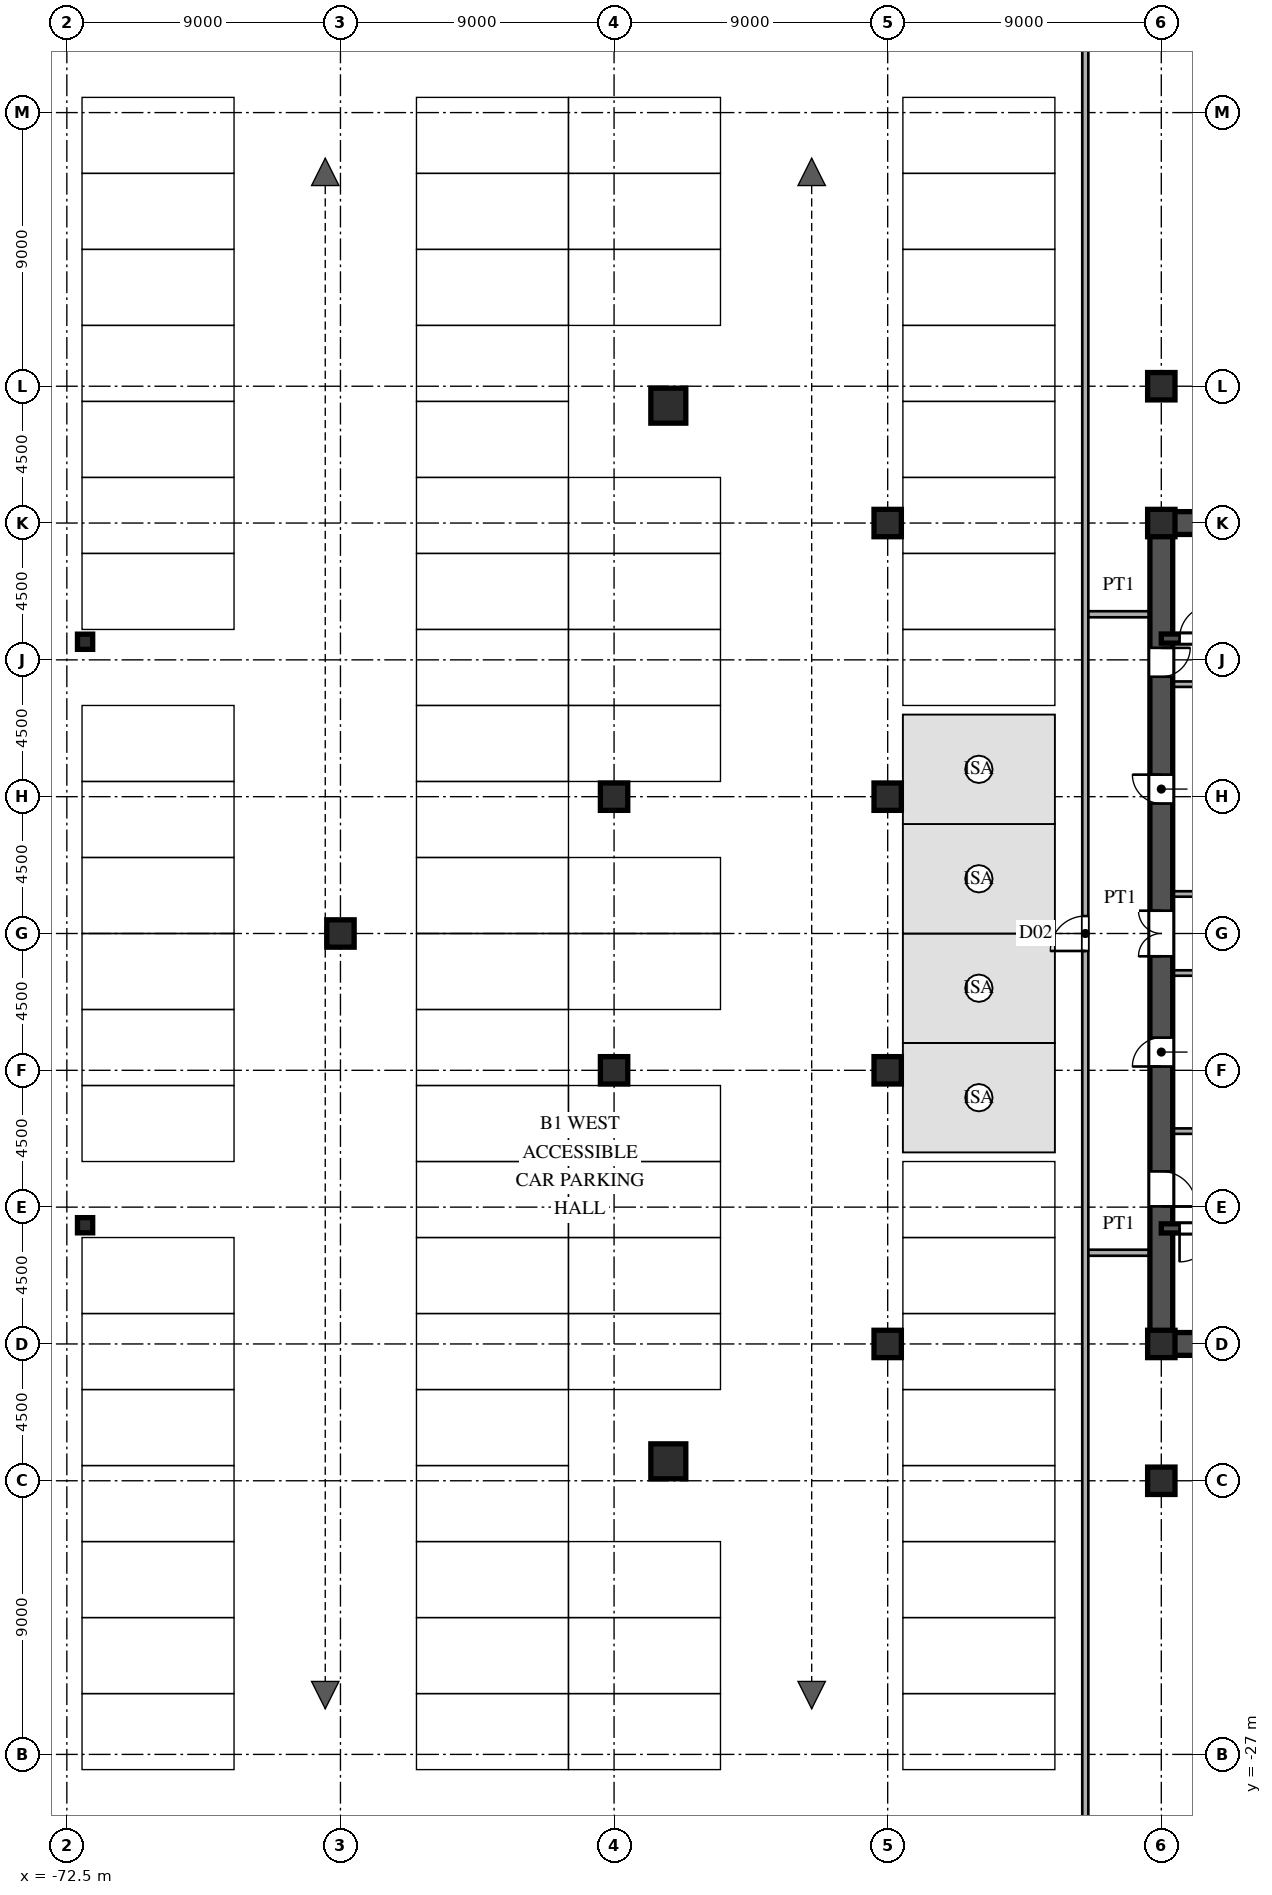
"""IFC4 building model, lengths in metres.
Left out: names, types, materials, properties, quantities, classifications, styles, units other than length and angle.
Written with IfcOpenShell. Run it as: python <this file> out.ifc"""

import sys

from ifc_helpers import new_model, si_unit, direction, frame, frame_2d, origin, origin_2d, place, context, subcontext, project, spatial, rectangle, hollow_rectangle, i_section, extrude, source, transform, mapped, element, fill, save


model = new_model("IFC4")
c1 = context("Model", 3, precision=1e-05, world=origin(), true_north=direction((0.0, 1.0)))
c2 = subcontext(c1, "Body", "Model", "MODEL_VIEW")
j1 = project(units=[si_unit("LENGTHUNIT", "METRE"), si_unit("PLANEANGLEUNIT", "RADIAN")], contexts=[c1])
p1 = place(None, origin())
s1 = spatial("IfcSite", under=j1, at=p1, CompositionType="ELEMENT")
p2 = place(p1, origin())
s2 = spatial("IfcBuilding", under=s1, at=p2, CompositionType="ELEMENT")
p3 = place(p2, frame((0.0, 0.0, -4.8)))
s3 = spatial("IfcBuildingStorey", under=s2, at=p3, CompositionType="ELEMENT", Elevation=-4.8)
m1 = source(origin(), c2, "Body", "SweptSolid", [
    extrude(i_section(OverallWidth=0.9, OverallDepth=0.9, WebThickness=0.036, FlangeThickness=0.055, at=origin_2d()), origin(), (0.0, 0.0, 1.0), 4.8),
])
for number, where, z_axis, x_axis in (
    (1, (-36.5, -18.0, 0.0), (0.0, 0.0, 1.0), (1.0, 0.0, 0.0)),
    (2, (-36.5, -13.5, 0.0), (0.0, 0.0, 1.0), (1.0, 0.0, 0.0)),
    (3, (-36.5, 13.5, 0.0), (0.0, 0.0, 1.0), (1.0, 0.0, 0.0)),
    (4, (-36.5, 18.0, 0.0), (0.0, 0.0, 1.0), (1.0, 0.0, 0.0)),
    (5, (-45.5, -13.5, 0.0), (0.0, 0.0, 1.0), (1.0, 0.0, 0.0)),
    (6, (-45.5, -4.5, 0.0), (0.0, 0.0, 1.0), (1.0, 0.0, 0.0)),
    (7, (-45.5, 4.5, 0.0), (0.0, 0.0, 1.0), (1.0, 0.0, 0.0)),
    (8, (-45.5, 13.5, 0.0), (0.0, 0.0, 1.0), (1.0, 0.0, 0.0)),
    (9, (-54.5, -4.5, 0.0), (0.0, 0.0, 1.0), (1.0, 0.0, 0.0)),
    (10, (-54.5, 4.5, 0.0), (0.0, 0.0, 1.0), (1.0, 0.0, 0.0)),
    (11, (-63.5, 0.0, 0.0), (0.0, 0.0, 1.0), (1.0, 0.0, 0.0)),
):
    element("IfcColumn", number, at=place(p3, frame(where, z_axis=z_axis, x_axis=x_axis)), inside=s3, PredefinedType="COLUMN", context=c2, shape_type="MappedRepresentation", body=[
        mapped(m1, transform((0.0, 0.0, 0.0), scale=1.0)),
    ])
m2 = source(origin(), c2, "Body", "SweptSolid", [
    extrude(hollow_rectangle(XDim=0.5, YDim=0.5, WallThickness=0.02, at=origin_2d()), origin(), (0.0, 0.0, 1.0), 4.8),
])
for number, where, z_axis, x_axis in (
    (12, (-71.9, 9.596, 0.0), (0.0, 0.0, 1.0), (1.0, 0.0, 0.0)),
    (13, (-71.9, -9.596, 0.0), (0.0, 0.0, 1.0), (1.0, 0.0, 0.0)),
):
    element("IfcColumn", number, at=place(p3, frame(where, z_axis=z_axis, x_axis=x_axis)), inside=s3, PredefinedType="COLUMN", context=c2, shape_type="MappedRepresentation", body=[
        mapped(m2, transform((0.0, 0.0, 0.0), scale=1.0)),
    ])
m3 = source(origin(), c2, "Body", "SweptSolid", [
    extrude(hollow_rectangle(XDim=1.15, YDim=1.15, WallThickness=0.048, at=origin_2d()), origin(), (0.0, 0.0, 1.0), 4.8),
])
for number, where, z_axis, x_axis in (
    (14, (-52.716, -17.361, 0.0), (0.0, 0.0, 1.0), (1.0, 0.0, 0.0)),
    (15, (-52.716, 17.361, 0.0), (0.0, 0.0, 1.0), (1.0, 0.0, 0.0)),
):
    element("IfcColumn", number, at=place(p3, frame(where, z_axis=z_axis, x_axis=x_axis)), inside=s3, PredefinedType="COLUMN", context=c2, shape_type="MappedRepresentation", body=[
        mapped(m3, transform((0.0, 0.0, 0.0), scale=1.0)),
    ])
for number, where, z_axis, x_axis in (
    (16, (-36.5, -13.5, 0.0), (0.0, 0.0, 1.0), (1.0, 0.0, 0.0)),
    (17, (-36.5, 13.5, 0.0), (0.0, 0.0, 1.0), (1.0, 0.0, 0.0)),
):
    element("IfcWall", number, at=place(p3, frame(where, z_axis=z_axis, x_axis=x_axis)), inside=s3, PredefinedType="SHEAR", context=c2, shape_type="SweptSolid", body=[
        extrude(rectangle(XDim=9.0, YDim=0.75, at=frame_2d((4.5, 0.0))), origin(), (0.0, 0.0, 1.0), 4.52),
    ])
p4 = place(p3, frame((-36.5, -13.65, 0.0), z_axis=(0.0, 0.0, 1.0), x_axis=(0.0, 1.0, 0.0)))
e18 = element("IfcWall", 18, at=p4, inside=s3, PredefinedType="SHEAR", context=c2, shape_type="SweptSolid", body=[
    extrude(rectangle(XDim=7.15, YDim=0.75, at=frame_2d((3.575, 0.0))), origin(), (0.0, 0.0, 1.0), 4.52),
])
p5 = place(p4, frame((4.675, 0.0, 0.0)))
e19 = element("IfcOpeningElement", 19, at=p5, cuts=e18, PredefinedType="OPENING", context=c2, shape_type="SweptSolid", body=[
    extrude(rectangle(XDim=1.15, YDim=2.2, at=frame_2d((0.575, 1.1))), frame((0.0, 0.385, 0.0), z_axis=(0.0, -1.0, 0.0), x_axis=(1.0, 0.0, 0.0)), (0.0, 0.0, 1.0), 0.77),
])
p6 = place(p3, frame((-36.5, -1.3, 0.0), z_axis=(0.0, 0.0, 1.0), x_axis=(0.0, 1.0, 0.0)))
e20 = element("IfcWall", 20, at=p6, inside=s3, PredefinedType="SHEAR", context=c2, shape_type="SweptSolid", body=[
    extrude(rectangle(XDim=2.6, YDim=0.75, at=frame_2d((1.3, 0.0))), origin(), (0.0, 0.0, 1.0), 4.52),
])
p7 = place(p6, frame((0.55, 0.0, 0.0)))
e21 = element("IfcOpeningElement", 21, at=p7, cuts=e20, PredefinedType="OPENING", context=c2, shape_type="SweptSolid", body=[
    extrude(rectangle(XDim=1.5, YDim=2.3, at=frame_2d((0.75, 1.15))), frame((0.0, 0.385, 0.0), z_axis=(0.0, -1.0, 0.0), x_axis=(1.0, 0.0, 0.0)), (0.0, 0.0, 1.0), 0.77),
])
p8 = place(p3, frame((-36.5, 8.2, 0.0), z_axis=(0.0, 0.0, 1.0), x_axis=(0.0, 1.0, 0.0)))
e22 = element("IfcWall", 22, at=p8, inside=s3, PredefinedType="SHEAR", context=c2, shape_type="SweptSolid", body=[
    extrude(rectangle(XDim=5.45, YDim=0.75, at=frame_2d((2.725, 0.0))), origin(), (0.0, 0.0, 1.0), 4.52),
])
p9 = place(p8, frame((0.245, 0.0, 0.0)))
e23 = element("IfcOpeningElement", 23, at=p9, cuts=e22, PredefinedType="OPENING", context=c2, shape_type="SweptSolid", body=[
    extrude(rectangle(XDim=0.95, YDim=2.15, at=frame_2d((0.475, 1.075))), frame((0.0, 0.385, 0.0), z_axis=(0.0, -1.0, 0.0), x_axis=(1.0, 0.0, 0.0)), (0.0, 0.0, 1.0), 0.77),
])
p10 = place(p3, frame((-36.5, -6.5, 0.0), z_axis=(0.0, 0.0, 1.0), x_axis=(0.0, 1.0, 0.0)))
e24 = element("IfcWall", 24, at=p10, inside=s3, PredefinedType="SHEAR", context=c2, shape_type="SweptSolid", body=[
    extrude(rectangle(XDim=5.2, YDim=0.75, at=frame_2d((2.6, 0.0))), origin(), (0.0, 0.0, 1.0), 4.52),
])
p11 = place(p10, frame((2.125, 0.0, 0.0)))
e25 = element("IfcOpeningElement", 25, at=p11, cuts=e24, PredefinedType="OPENING", context=c2, shape_type="SweptSolid", body=[
    extrude(rectangle(XDim=0.95, YDim=2.15, at=frame_2d((0.475, 1.075))), frame((0.0, 0.385, 0.0), z_axis=(0.0, -1.0, 0.0), x_axis=(1.0, 0.0, 0.0)), (0.0, 0.0, 1.0), 0.77),
])
p12 = place(p3, frame((-36.5, 1.3, 0.0), z_axis=(0.0, 0.0, 1.0), x_axis=(0.0, 1.0, 0.0)))
e26 = element("IfcWall", 26, at=p12, inside=s3, PredefinedType="SHEAR", context=c2, shape_type="SweptSolid", body=[
    extrude(rectangle(XDim=6.9, YDim=0.75, at=frame_2d((3.45, 0.0))), origin(), (0.0, 0.0, 1.0), 4.52),
])
p13 = place(p12, frame((2.975, 0.0, 0.0)))
e27 = element("IfcOpeningElement", 27, at=p13, cuts=e26, PredefinedType="OPENING", context=c2, shape_type="SweptSolid", body=[
    extrude(rectangle(XDim=0.95, YDim=2.15, at=frame_2d((0.475, 1.075))), frame((0.0, 0.385, 0.0), z_axis=(0.0, -1.0, 0.0), x_axis=(1.0, 0.0, 0.0)), (0.0, 0.0, 1.0), 0.77),
])
p14 = place(p3, frame((-36.5, -9.7, 0.0), z_axis=(0.0, 0.0, 1.0), x_axis=(1.0, 0.0, 0.0)))
e28 = element("IfcWall", 28, at=p14, inside=s3, PredefinedType="SHEAR", context=c2, shape_type="SweptSolid", body=[
    extrude(rectangle(XDim=9.0, YDim=0.3, at=frame_2d((4.5, 0.0))), origin(), (0.0, 0.0, 1.0), 4.52),
])
p15 = place(p14, frame((0.6, 0.0, 0.0)))
e29 = element("IfcOpeningElement", 29, at=p15, cuts=e28, PredefinedType="OPENING", context=c2, shape_type="SweptSolid", body=[
    extrude(rectangle(XDim=1.1, YDim=2.2, at=frame_2d((0.55, 1.1))), frame((0.0, 0.16, 0.0), z_axis=(0.0, -1.0, 0.0), x_axis=(1.0, 0.0, 0.0)), (0.0, 0.0, 1.0), 0.32),
])
p16 = place(p3, frame((-36.5, 9.7, 0.0), z_axis=(0.0, 0.0, 1.0), x_axis=(1.0, 0.0, 0.0)))
e30 = element("IfcWall", 30, at=p16, inside=s3, PredefinedType="SHEAR", context=c2, shape_type="SweptSolid", body=[
    extrude(rectangle(XDim=9.0, YDim=0.3, at=frame_2d((4.5, 0.0))), origin(), (0.0, 0.0, 1.0), 4.52),
])
p17 = place(p16, frame((0.6, 0.0, 0.0)))
e31 = element("IfcOpeningElement", 31, at=p17, cuts=e30, PredefinedType="OPENING", context=c2, shape_type="SweptSolid", body=[
    extrude(rectangle(XDim=1.1, YDim=2.2, at=frame_2d((0.55, 1.1))), frame((0.0, 0.16, 0.0), z_axis=(0.0, -1.0, 0.0), x_axis=(1.0, 0.0, 0.0)), (0.0, 0.0, 1.0), 0.32),
])
for number, where, z_axis, x_axis in (
    (32, (-36.15, -6.5, 0.0), (0.0, 0.0, 1.0), (1.0, 0.0, 0.0)),
    (33, (-36.15, 8.2, 0.0), (0.0, 0.0, 1.0), (1.0, 0.0, 0.0)),
):
    element("IfcWall", number, at=place(p3, frame(where, z_axis=z_axis, x_axis=x_axis)), inside=s3, PredefinedType="PARTITIONING", context=c2, shape_type="SweptSolid", body=[
        extrude(rectangle(XDim=5.7, YDim=0.18, at=frame_2d((2.85, 0.0))), origin(), (0.0, 0.0, 1.0), 4.52),
    ])
for number, where, z_axis, x_axis in (
    (34, (-36.15, -1.3, 0.0), (0.0, 0.0, 1.0), (1.0, 0.0, 0.0)),
    (35, (-36.15, 1.3, 0.0), (0.0, 0.0, 1.0), (1.0, 0.0, 0.0)),
):
    element("IfcWall", number, at=place(p3, frame(where, z_axis=z_axis, x_axis=x_axis)), inside=s3, PredefinedType="PARTITIONING", context=c2, shape_type="SweptSolid", body=[
        extrude(rectangle(XDim=2.95, YDim=0.18, at=frame_2d((1.475, 0.0))), origin(), (0.0, 0.0, 1.0), 4.52),
    ])
for number, where, z_axis, x_axis in (
    (36, (-38.915, -10.5, 0.0), (0.0, 0.0, 1.0), (1.0, 0.0, 0.0)),
    (37, (-38.915, 10.5, 0.0), (0.0, 0.0, 1.0), (1.0, 0.0, 0.0)),
):
    element("IfcWall", number, at=place(p3, frame(where, z_axis=z_axis, x_axis=x_axis)), inside=s3, PredefinedType="PARTITIONING", context=c2, shape_type="SweptSolid", body=[
        extrude(rectangle(XDim=2.035, YDim=0.2, at=frame_2d((1.018, 0.0))), origin(), (0.0, 0.0, 1.0), 4.52),
    ])
p18 = place(p3, frame((-39.0, -35.795, 0.0), z_axis=(0.0, 0.0, 1.0), x_axis=(0.0, 1.0, 0.0)))
e38 = element("IfcWall", 38, at=p18, inside=s3, PredefinedType="PARTITIONING", context=c2, shape_type="SweptSolid", body=[
    extrude(rectangle(XDim=71.59, YDim=0.2, at=frame_2d((35.795, 0.0))), origin(), (0.0, 0.0, 1.0), 4.52),
])
p19 = place(p18, frame((35.22, 0.0, 0.0)))
e39 = element("IfcOpeningElement", 39, at=p19, cuts=e38, PredefinedType="OPENING", context=c2, shape_type="SweptSolid", body=[
    extrude(rectangle(XDim=1.15, YDim=2.2, at=frame_2d((0.575, 1.1))), frame((0.0, 0.11, 0.0), z_axis=(0.0, -1.0, 0.0), x_axis=(1.0, 0.0, 0.0)), (0.0, 0.0, 1.0), 0.22),
])
m4 = source(origin(), c2, "Body", "SweptSolid", [
    extrude(rectangle(XDim=1.15, YDim=2.2, at=frame_2d((0.575, 1.1))), frame((0.0, 0.025, 0.0), z_axis=(0.0, -1.0, 0.0), x_axis=(1.0, 0.0, 0.0)), (0.0, 0.0, 1.0), 0.05),
])
p20 = place(p5, frame((1.15, 0.0, 0.0), z_axis=(0.0, 0.0, 1.0), x_axis=(-1.0, 0.0, 0.0)))
e40 = element("IfcDoor", 40, at=p20, inside=s3, OperationType="SINGLE_SWING_LEFT", PredefinedType="DOOR", context=c2, shape_type="MappedRepresentation", body=[
    mapped(m4, transform((0.0, 0.0, 0.0), scale=1.0)),
])
fill(e19, e40)
m5 = source(origin(), c2, "Body", "SweptSolid", [
    extrude(rectangle(XDim=1.5, YDim=2.3, at=frame_2d((0.75, 1.15))), frame((0.0, 0.025, 0.0), z_axis=(0.0, -1.0, 0.0), x_axis=(1.0, 0.0, 0.0)), (0.0, 0.0, 1.0), 0.05),
])
p21 = place(p7, origin())
e41 = element("IfcDoor", 41, at=p21, inside=s3, OperationType="DOUBLE_SWING_LEFT", PredefinedType="DOOR", context=c2, shape_type="MappedRepresentation", body=[
    mapped(m5, transform((0.0, 0.0, 0.0), scale=1.0)),
])
fill(e21, e41)
m6 = source(origin(), c2, "Body", "SweptSolid", [
    extrude(rectangle(XDim=0.95, YDim=2.15, at=frame_2d((0.475, 1.075))), frame((0.0, 0.025, 0.0), z_axis=(0.0, -1.0, 0.0), x_axis=(1.0, 0.0, 0.0)), (0.0, 0.0, 1.0), 0.05),
])
p22 = place(p9, frame((0.95, 0.0, 0.0), z_axis=(0.0, 0.0, 1.0), x_axis=(-1.0, 0.0, 0.0)))
e42 = element("IfcDoor", 42, at=p22, inside=s3, OperationType="SINGLE_SWING_RIGHT", PredefinedType="DOOR", context=c2, shape_type="MappedRepresentation", body=[
    mapped(m6, transform((0.0, 0.0, 0.0), scale=1.0)),
])
fill(e23, e42)
p23 = place(p11, origin())
e43 = element("IfcDoor", 43, at=p23, inside=s3, OperationType="SINGLE_SWING_LEFT", PredefinedType="DOOR", context=c2, shape_type="MappedRepresentation", body=[
    mapped(m6, transform((0.0, 0.0, 0.0), scale=1.0)),
])
fill(e25, e43)
p24 = place(p13, origin())
e44 = element("IfcDoor", 44, at=p24, inside=s3, OperationType="SINGLE_SWING_RIGHT", PredefinedType="DOOR", context=c2, shape_type="MappedRepresentation", body=[
    mapped(m6, transform((0.0, 0.0, 0.0), scale=1.0)),
])
fill(e27, e44)
m7 = source(origin(), c2, "Body", "SweptSolid", [
    extrude(rectangle(XDim=1.1, YDim=2.2, at=frame_2d((0.55, 1.1))), frame((0.0, 0.025, 0.0), z_axis=(0.0, -1.0, 0.0), x_axis=(1.0, 0.0, 0.0)), (0.0, 0.0, 1.0), 0.05),
])
p25 = place(p15, frame((1.1, 0.0, 0.0), z_axis=(0.0, 0.0, 1.0), x_axis=(-1.0, 0.0, 0.0)))
e45 = element("IfcDoor", 45, at=p25, inside=s3, OperationType="SINGLE_SWING_LEFT", PredefinedType="DOOR", context=c2, shape_type="MappedRepresentation", body=[
    mapped(m7, transform((0.0, 0.0, 0.0), scale=1.0)),
])
fill(e29, e45)
p26 = place(p17, origin())
e46 = element("IfcDoor", 46, at=p26, inside=s3, OperationType="SINGLE_SWING_RIGHT", PredefinedType="DOOR", context=c2, shape_type="MappedRepresentation", body=[
    mapped(m7, transform((0.0, 0.0, 0.0), scale=1.0)),
])
fill(e31, e46)
p27 = place(p19, origin())
e47 = element("IfcDoor", 47, at=p27, inside=s3, OperationType="SINGLE_SWING_LEFT", PredefinedType="DOOR", context=c2, shape_type="MappedRepresentation", body=[
    mapped(m4, transform((0.0, 0.0, 0.0), scale=1.0)),
])
fill(e39, e47)
save(model, sys.argv[1])
